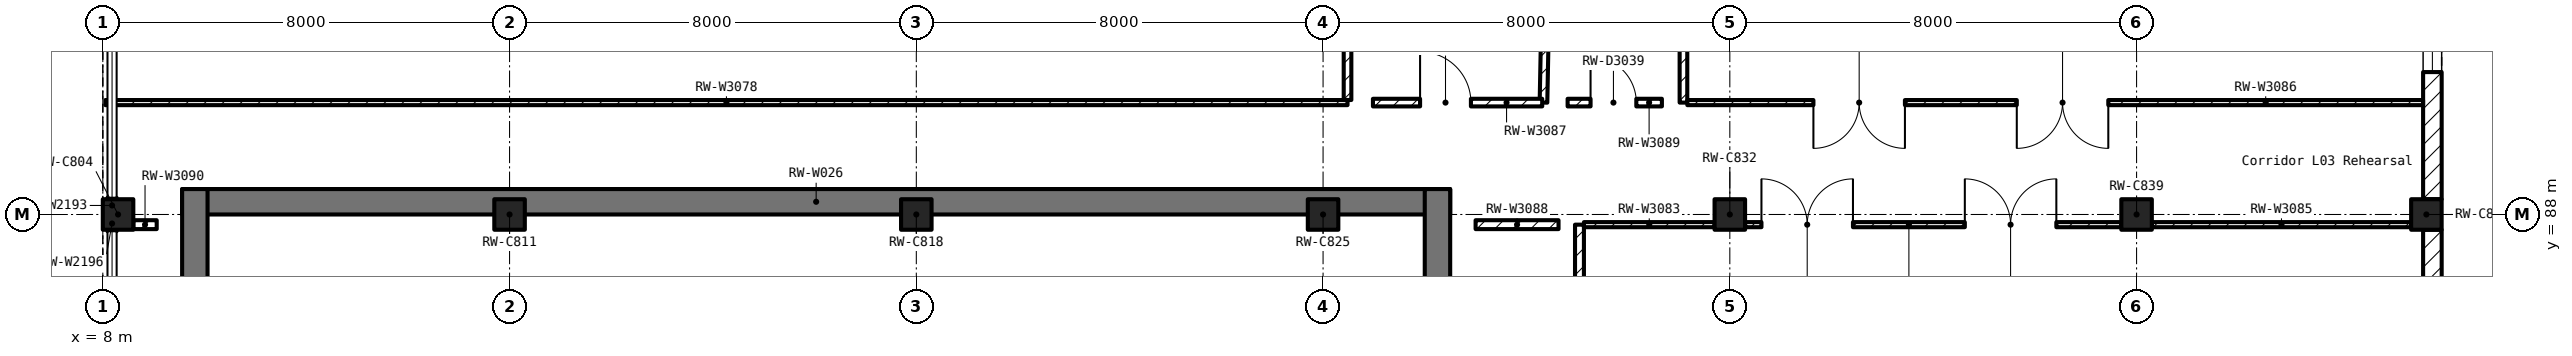
"""IFC4 building model, lengths in metres.
Left out: names, types, materials, properties, quantities, classifications, styles, units other than length and angle.
Written with IfcOpenShell. Run it as: python <this file> out.ifc"""

import sys

from ifc_helpers import new_model, si_unit, direction, frame, frame_2d, origin, origin_2d, place, context, subcontext, project, spatial, polyline, rectangle, outline, extrude, element, fill, save


model = new_model("IFC4")
c1 = context("Model", 3, precision=1e-05, world=origin(), true_north=direction((0.0, 1.0)))
c2 = subcontext(c1, "Body", "Model", "MODEL_VIEW")
j1 = project(units=[si_unit("LENGTHUNIT", "METRE"), si_unit("PLANEANGLEUNIT", "RADIAN")], contexts=[c1])
p1 = place(None, origin())
s1 = spatial("IfcSite", under=j1, at=p1, CompositionType="ELEMENT")
p2 = place(p1, origin())
s2 = spatial("IfcBuilding", under=s1, at=p2, CompositionType="ELEMENT")
p3 = place(p2, frame((0.0, 0.0, 17.0)))
s3 = spatial("IfcBuildingStorey", under=s2, at=p3, CompositionType="ELEMENT", Elevation=17.0)
for number, where, z_axis, x_axis in (
    (1, (8.3, 88.0, 0.0), (0.0, 0.0, 1.0), (1.0, 0.0, 0.0)),
    (2, (16.0, 88.0, 0.0), (0.0, 0.0, 1.0), (1.0, 0.0, 0.0)),
    (3, (24.0, 88.0, 0.0), (0.0, 0.0, 1.0), (1.0, 0.0, 0.0)),
    (4, (32.0, 88.0, 0.0), (0.0, 0.0, 1.0), (1.0, 0.0, 0.0)),
    (5, (40.0, 88.0, 0.0), (0.0, 0.0, 1.0), (1.0, 0.0, 0.0)),
    (6, (48.0, 88.0, 0.0), (0.0, 0.0, 1.0), (1.0, 0.0, 0.0)),
    (7, (53.7, 88.0, 0.0), (0.0, 0.0, 1.0), (1.0, 0.0, 0.0)),
):
    element("IfcColumn", number, at=place(p3, frame(where, z_axis=z_axis, x_axis=x_axis)), inside=s3, PredefinedType="COLUMN", context=c2, shape_type="SweptSolid", body=[
        extrude(rectangle(XDim=0.6, YDim=0.6, at=origin_2d()), origin(), (0.0, 0.0, 1.0), 5.5),
    ])
p4 = place(p3, frame((9.56, 88.25, 0.0), z_axis=(0.0, 0.0, 1.0), x_axis=(1.0, 0.0, 0.0)))
e8 = element("IfcWall", 8, at=p4, inside=s3, PredefinedType="SHEAR", context=c2, shape_type="SweptSolid", body=[
    extrude(rectangle(XDim=24.94, YDim=0.5, at=frame_2d((12.47, 0.0))), origin(), (0.0, 0.0, 1.0), 5.5),
])
for number, where, z_axis, x_axis in (
    (9, (9.81, 65.5, 0.0), (0.0, 0.0, 1.0), (0.0, 1.0, 0.0)),
    (10, (34.25, 65.5, 0.0), (0.0, 0.0, 1.0), (0.0, 1.0, 0.0)),
):
    element("IfcWall", number, at=place(p3, frame(where, z_axis=z_axis, x_axis=x_axis)), inside=s3, PredefinedType="SHEAR", context=c2, shape_type="SweptSolid", body=[
        extrude(outline(polyline([(0.0, 0.0), (23.0, 0.0), (23.0, 5.5), (6.501, 5.5), (6.5, 5.5), (6.5, 5.35), (0.0, 5.35), (0.0, 0.0)])), frame((0.0, 0.25, 0.0), z_axis=(0.0, -1.0, 0.0), x_axis=(1.0, 0.0, 0.0)), (0.0, 0.0, 1.0), 0.5),
    ])
p5 = place(p3, frame((53.818, 80.243, 0.0), z_axis=(0.0, 0.0, 1.0), x_axis=(0.0, 1.0, 0.0)))
e11 = element("IfcWall", 11, at=p5, inside=s3, PredefinedType="SOLIDWALL", context=c2, shape_type="SweptSolid", body=[
    extrude(rectangle(XDim=7.457, YDim=0.365, at=frame_2d((3.729, 0.0))), origin(), (0.0, 0.0, 1.0), 4.55),
])
p6 = place(p5, frame((2.529, 0.0, 1.0)))
e12 = element("IfcOpeningElement", 12, at=p6, cuts=e11, PredefinedType="OPENING", context=c2, shape_type="SweptSolid", body=[
    extrude(rectangle(XDim=2.4, YDim=2.0, at=frame_2d((1.2, 1.0))), frame((0.0, 0.195, 0.0), z_axis=(0.0, -1.0, 0.0), x_axis=(1.0, 0.0, 0.0)), (0.0, 0.0, 1.0), 0.389),
])
p7 = place(p3, frame((53.818, 88.3, 0.0), z_axis=(0.0, 0.0, 1.0), x_axis=(0.0, 1.0, 0.0)))
e13 = element("IfcWall", 13, at=p7, inside=s3, PredefinedType="SOLIDWALL", context=c2, shape_type="SweptSolid", body=[
    extrude(rectangle(XDim=7.4, YDim=0.365, at=frame_2d((3.7, 0.0))), origin(), (0.0, 0.0, 1.0), 4.55),
])
p8 = place(p7, frame((2.5, 0.0, 1.0)))
e14 = element("IfcOpeningElement", 14, at=p8, cuts=e13, PredefinedType="OPENING", context=c2, shape_type="SweptSolid", body=[
    extrude(rectangle(XDim=2.4, YDim=2.0, at=frame_2d((1.2, 1.0))), frame((0.0, 0.195, 0.0), z_axis=(0.0, -1.0, 0.0), x_axis=(1.0, 0.0, 0.0)), (0.0, 0.0, 1.0), 0.389),
])
p9 = place(p3, frame((32.481, 90.2, 0.0), z_axis=(0.0, 0.0, 1.0), x_axis=(-1.0, 0.0, 0.0)))
e15 = element("IfcWall", 15, at=p9, inside=s3, PredefinedType="PARTITIONING", context=c2, shape_type="SweptSolid", body=[
    extrude(rectangle(XDim=24.431, YDim=0.1, at=frame_2d((12.215, 0.0))), origin(), (0.0, 0.0, 1.0), 4.45),
])
p10 = place(p3, frame((37.043, 87.8, 0.0), z_axis=(0.0, 0.0, 1.0), x_axis=(0.0, -1.0, 0.0)))
e16 = element("IfcWall", 16, at=p10, inside=s3, PredefinedType="PARTITIONING", context=c2, shape_type="SweptSolid", body=[
    extrude(rectangle(XDim=23.75, YDim=0.175, at=frame_2d((11.875, 0.0))), origin(), (0.0, 0.0, 1.0), 4.35),
])
p11 = place(p10, frame((11.0, 0.0, 0.0)))
e17 = element("IfcOpeningElement", 17, at=p11, cuts=e16, PredefinedType="OPENING", context=c2, shape_type="SweptSolid", body=[
    extrude(rectangle(XDim=1.8, YDim=2.1, at=frame_2d((0.9, 1.05))), frame((0.0, 0.1, 0.0), z_axis=(0.0, -1.0, 0.0), x_axis=(1.0, 0.0, 0.0)), (0.0, 0.0, 1.0), 0.199),
])
p12 = place(p10, frame((15.0, 0.0, 0.0)))
e18 = element("IfcOpeningElement", 18, at=p12, cuts=e16, PredefinedType="OPENING", context=c2, shape_type="SweptSolid", body=[
    extrude(rectangle(XDim=1.8, YDim=2.1, at=frame_2d((0.9, 1.05))), frame((0.0, 0.1, 0.0), z_axis=(0.0, -1.0, 0.0), x_axis=(1.0, 0.0, 0.0)), (0.0, 0.0, 1.0), 0.199),
])
p13 = place(p3, frame((32.481, 111.634, 0.0), z_axis=(0.0, 0.0, 1.0), x_axis=(0.0, -1.0, 0.0)))
e19 = element("IfcWall", 19, at=p13, inside=s3, PredefinedType="PARTITIONING", context=c2, shape_type="SweptSolid", body=[
    extrude(rectangle(XDim=21.383, YDim=0.15, at=frame_2d((10.691, 0.0))), origin(), (0.0, 0.0, 1.0), 4.45),
])
p14 = place(p3, frame((36.335, 90.2, 0.0), z_axis=(0.0, 0.0, 1.0), x_axis=(0.019644475983, 0.999807028663, 0.0)))
e20 = element("IfcWall", 20, at=p14, inside=s3, PredefinedType="PARTITIONING", context=c2, shape_type="SweptSolid", body=[
    extrude(rectangle(XDim=21.438, YDim=0.15, at=frame_2d((10.719, 0.0))), origin(), (0.0, 0.0, 1.0), 4.45),
])
p15 = place(p3, frame((39.088, 90.2, 0.0), z_axis=(0.0, 0.0, 1.0), x_axis=(0.0, 1.0, 0.0)))
e21 = element("IfcWall", 21, at=p15, inside=s3, PredefinedType="PARTITIONING", context=c2, shape_type="SweptSolid", body=[
    extrude(rectangle(XDim=21.434, YDim=0.15, at=frame_2d((10.717, 0.0))), origin(), (0.0, 0.0, 1.0), 4.45),
])
p16 = place(p3, frame((37.131, 87.8, 0.0), z_axis=(0.0, 0.0, 1.0), x_axis=(1.0, 0.0, 0.0)))
e22 = element("IfcWall", 22, at=p16, inside=s3, PredefinedType="PARTITIONING", context=c2, shape_type="SweptSolid", body=[
    extrude(rectangle(XDim=2.569, YDim=0.1, at=frame_2d((1.284, 0.0))), origin(), (0.0, 0.0, 1.0), 4.35),
])
p17 = place(p3, frame((40.3, 87.8, 0.0), z_axis=(0.0, 0.0, 1.0), x_axis=(1.0, 0.0, 0.0)))
e23 = element("IfcWall", 23, at=p17, inside=s3, PredefinedType="PARTITIONING", context=c2, shape_type="SweptSolid", body=[
    extrude(rectangle(XDim=7.4, YDim=0.1, at=frame_2d((3.7, 0.0))), origin(), (0.0, 0.0, 1.0), 4.35),
])
p18 = place(p17, frame((4.322, 0.0, 0.0)))
e24 = element("IfcOpeningElement", 24, at=p18, cuts=e23, PredefinedType="OPENING", context=c2, shape_type="SweptSolid", body=[
    extrude(rectangle(XDim=1.8, YDim=2.1, at=frame_2d((0.9, 1.05))), frame((0.0, 0.062, 0.0), z_axis=(0.0, -1.0, 0.0), x_axis=(1.0, 0.0, 0.0)), (0.0, 0.0, 1.0), 0.124),
])
p19 = place(p17, frame((0.322, 0.0, 0.0)))
e25 = element("IfcOpeningElement", 25, at=p19, cuts=e23, PredefinedType="OPENING", context=c2, shape_type="SweptSolid", body=[
    extrude(rectangle(XDim=1.8, YDim=2.1, at=frame_2d((0.9, 1.05))), frame((0.0, 0.062, 0.0), z_axis=(0.0, -1.0, 0.0), x_axis=(1.0, 0.0, 0.0)), (0.0, 0.0, 1.0), 0.124),
])
p20 = place(p3, frame((48.3, 87.8, 0.0), z_axis=(0.0, 0.0, 1.0), x_axis=(1.0, 0.0, 0.0)))
e26 = element("IfcWall", 26, at=p20, inside=s3, PredefinedType="PARTITIONING", context=c2, shape_type="SweptSolid", body=[
    extrude(rectangle(XDim=5.1, YDim=0.1, at=frame_2d((2.55, 0.0))), origin(), (0.0, 0.0, 1.0), 4.35),
])
p21 = place(p3, frame((53.635, 90.2, 0.0), z_axis=(0.0, 0.0, 1.0), x_axis=(-1.0, 0.0, 0.0)))
e27 = element("IfcWall", 27, at=p21, inside=s3, PredefinedType="PARTITIONING", context=c2, shape_type="SweptSolid", body=[
    extrude(rectangle(XDim=14.471, YDim=0.1, at=frame_2d((7.235, 0.0))), origin(), (0.0, 0.0, 1.0), 4.45),
])
p22 = place(p21, frame((6.191, 0.0, 0.0)))
e28 = element("IfcOpeningElement", 28, at=p22, cuts=e27, PredefinedType="OPENING", context=c2, shape_type="SweptSolid", body=[
    extrude(rectangle(XDim=1.8, YDim=2.1, at=frame_2d((0.9, 1.05))), frame((0.0, 0.062, 0.0), z_axis=(0.0, -1.0, 0.0), x_axis=(1.0, 0.0, 0.0)), (0.0, 0.0, 1.0), 0.124),
])
p23 = place(p21, frame((10.191, 0.0, 0.0)))
e29 = element("IfcOpeningElement", 29, at=p23, cuts=e27, PredefinedType="OPENING", context=c2, shape_type="SweptSolid", body=[
    extrude(rectangle(XDim=1.8, YDim=2.1, at=frame_2d((0.9, 1.05))), frame((0.0, 0.062, 0.0), z_axis=(0.0, -1.0, 0.0), x_axis=(1.0, 0.0, 0.0)), (0.0, 0.0, 1.0), 0.124),
])
p24 = place(p3, frame((32.981, 90.2, 0.0), z_axis=(0.0, 0.0, 1.0), x_axis=(1.0, 0.0, 0.0)))
e30 = element("IfcWall", 30, at=p24, inside=s3, PredefinedType="PARTITIONING", context=c2, shape_type="SweptSolid", body=[
    extrude(rectangle(XDim=3.329, YDim=0.15, at=frame_2d((1.665, 0.0))), origin(), (0.0, 0.0, 1.0), 4.45),
])
p25 = place(p24, frame((0.927, 0.0, 0.0)))
e31 = element("IfcOpeningElement", 31, at=p25, cuts=e30, PredefinedType="OPENING", context=c2, shape_type="SweptSolid", body=[
    extrude(rectangle(XDim=1.0, YDim=2.1, at=frame_2d((0.5, 1.05))), frame((0.0, 0.087, 0.0), z_axis=(0.0, -1.0, 0.0), x_axis=(1.0, 0.0, 0.0)), (0.0, 0.0, 1.0), 0.174),
])
p26 = place(p3, frame((35.0, 87.8, 0.0), z_axis=(0.0, 0.0, 1.0), x_axis=(1.0, 0.0, 0.0)))
e32 = element("IfcWall", 32, at=p26, inside=s3, PredefinedType="PARTITIONING", context=c2, shape_type="SweptSolid", body=[
    extrude(rectangle(XDim=1.631, YDim=0.175, at=frame_2d((0.815, 0.0))), origin(), (0.0, 0.0, 1.0), 4.35),
])
p27 = place(p3, frame((36.81, 90.2, 0.0), z_axis=(0.0, 0.0, 1.0), x_axis=(1.0, 0.0, 0.0)))
e33 = element("IfcWall", 33, at=p27, inside=s3, PredefinedType="PARTITIONING", context=c2, shape_type="SweptSolid", body=[
    extrude(rectangle(XDim=1.854, YDim=0.15, at=frame_2d((0.927, 0.0))), origin(), (0.0, 0.0, 1.0), 4.45),
])
p28 = place(p27, frame((0.451, 0.0, 0.0)))
e34 = element("IfcOpeningElement", 34, at=p28, cuts=e33, PredefinedType="OPENING", context=c2, shape_type="SweptSolid", body=[
    extrude(rectangle(XDim=0.9, YDim=2.1, at=frame_2d((0.45, 1.05))), frame((0.0, 0.087, 0.0), z_axis=(0.0, -1.0, 0.0), x_axis=(1.0, 0.0, 0.0)), (0.0, 0.0, 1.0), 0.174),
])
p29 = place(p3, frame((8.601, 87.8, 0.0), z_axis=(0.0, 0.0, 1.0), x_axis=(1.0, 0.0, 0.0)))
e35 = element("IfcWall", 35, at=p29, inside=s3, PredefinedType="PARTITIONING", context=c2, shape_type="SweptSolid", body=[
    extrude(rectangle(XDim=0.459, YDim=0.175, at=frame_2d((0.229, 0.0))), origin(), (0.0, 0.0, 1.0), 4.35),
])
for number, where, z_axis, x_axis in (
    (36, (8.182, 88.33, 0.0), (0.0, 0.0, 1.0), (0.0, -1.0, 0.0)),
    (37, (8.182, 87.67, 0.0), (0.0, 0.0, 1.0), (0.0, 1.0, 0.0)),
):
    element("IfcWall", number, at=place(p3, frame(where, z_axis=z_axis, x_axis=x_axis)), inside=s3, PredefinedType="SOLIDWALL", context=c2, shape_type="SweptSolid", body=[
        extrude(rectangle(XDim=0.305, YDim=0.18, at=frame_2d((0.153, 0.0))), origin(), (0.0, 0.0, 1.0), 3.7),
    ])
p30 = place(p8, origin())
e38 = element("IfcWindow", 38, at=p30, inside=s3, PartitioningType="DOUBLE_PANEL_VERTICAL", PredefinedType="WINDOW", context=c2, shape_type="SweptSolid", body=[
    extrude(rectangle(XDim=2.4, YDim=2.0, at=frame_2d((1.2, 1.0))), frame((0.0, 0.03, 0.0), z_axis=(0.0, -1.0, 0.0), x_axis=(1.0, 0.0, 0.0)), (0.0, 0.0, 1.0), 0.06),
])
fill(e14, e38)
p31 = place(p25, origin())
e39 = element("IfcDoor", 39, at=p31, inside=s3, OperationType="SINGLE_SWING_LEFT", PredefinedType="DOOR", context=c2, shape_type="SweptSolid", body=[
    extrude(rectangle(XDim=1.0, YDim=2.1, at=frame_2d((0.5, 1.05))), frame((0.0, 0.025, 0.0), z_axis=(0.0, -1.0, 0.0), x_axis=(1.0, 0.0, 0.0)), (0.0, 0.0, 1.0), 0.05),
])
fill(e31, e39)
p32 = place(p28, origin())
e40 = element("IfcDoor", 40, at=p32, inside=s3, OperationType="SINGLE_SWING_LEFT", PredefinedType="DOOR", context=c2, shape_type="SweptSolid", body=[
    extrude(rectangle(XDim=0.9, YDim=2.1, at=frame_2d((0.45, 1.05))), frame((0.0, 0.025, 0.0), z_axis=(0.0, -1.0, 0.0), x_axis=(1.0, 0.0, 0.0)), (0.0, 0.0, 1.0), 0.05),
])
fill(e34, e40)
p33 = place(p18, origin())
e41 = element("IfcDoor", 41, at=p33, inside=s3, OperationType="DOUBLE_DOOR_SINGLE_SWING", PredefinedType="DOOR", context=c2, shape_type="SweptSolid", body=[
    extrude(rectangle(XDim=1.8, YDim=2.1, at=frame_2d((0.9, 1.05))), frame((0.0, 0.025, 0.0), z_axis=(0.0, -1.0, 0.0), x_axis=(1.0, 0.0, 0.0)), (0.0, 0.0, 1.0), 0.05),
])
fill(e24, e41)
p34 = place(p19, origin())
e42 = element("IfcDoor", 42, at=p34, inside=s3, OperationType="DOUBLE_DOOR_SINGLE_SWING", PredefinedType="DOOR", context=c2, shape_type="SweptSolid", body=[
    extrude(rectangle(XDim=1.8, YDim=2.1, at=frame_2d((0.9, 1.05))), frame((0.0, 0.025, 0.0), z_axis=(0.0, -1.0, 0.0), x_axis=(1.0, 0.0, 0.0)), (0.0, 0.0, 1.0), 0.05),
])
fill(e25, e42)
p35 = place(p22, origin())
e43 = element("IfcDoor", 43, at=p35, inside=s3, OperationType="DOUBLE_DOOR_SINGLE_SWING", PredefinedType="DOOR", context=c2, shape_type="SweptSolid", body=[
    extrude(rectangle(XDim=1.8, YDim=2.1, at=frame_2d((0.9, 1.05))), frame((0.0, 0.025, 0.0), z_axis=(0.0, -1.0, 0.0), x_axis=(1.0, 0.0, 0.0)), (0.0, 0.0, 1.0), 0.05),
])
fill(e28, e43)
p36 = place(p23, origin())
e44 = element("IfcDoor", 44, at=p36, inside=s3, OperationType="DOUBLE_DOOR_SINGLE_SWING", PredefinedType="DOOR", context=c2, shape_type="SweptSolid", body=[
    extrude(rectangle(XDim=1.8, YDim=2.1, at=frame_2d((0.9, 1.05))), frame((0.0, 0.025, 0.0), z_axis=(0.0, -1.0, 0.0), x_axis=(1.0, 0.0, 0.0)), (0.0, 0.0, 1.0), 0.05),
])
fill(e29, e44)
save(model, sys.argv[1])
